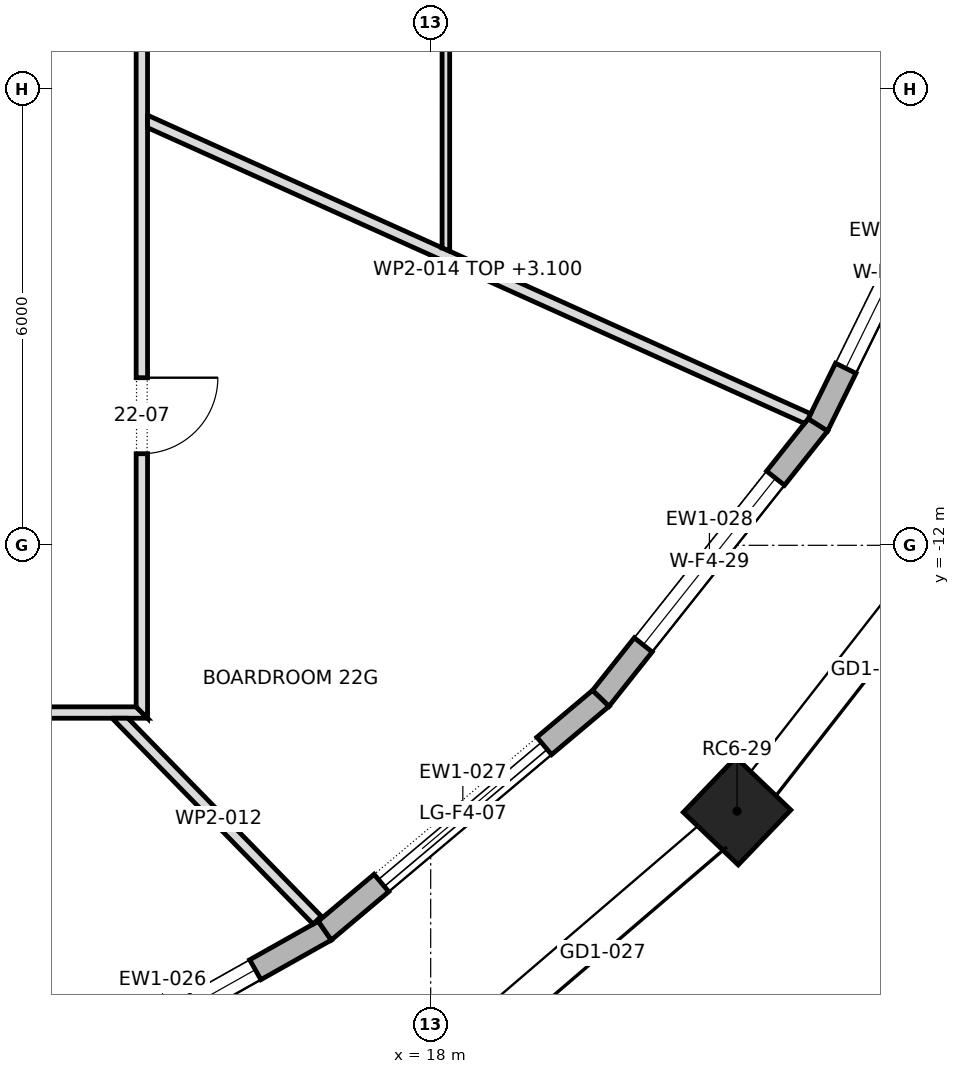
"""IFC4 building model, lengths in metres.
Left out: names, types, materials, properties, quantities, classifications, styles, units other than length and angle.
Written with IfcOpenShell. Run it as: python <this file> out.ifc"""

import sys

from ifc_helpers import new_model, si_unit, direction, frame, frame_2d, origin, origin_2d, place, context, subcontext, project, spatial, polyline, rectangle, outline, extrude, element, fill, save


model = new_model("IFC4")
c1 = context("Model", 3, precision=1e-05, world=origin(), true_north=direction((0.0, 1.0)))
c2 = subcontext(c1, "Body", "Model", "MODEL_VIEW")
j1 = project(units=[si_unit("LENGTHUNIT", "METRE"), si_unit("PLANEANGLEUNIT", "RADIAN")], contexts=[c1])
p1 = place(None, origin())
s1 = spatial("IfcSite", under=j1, at=p1, CompositionType="ELEMENT")
p2 = place(p1, origin())
s2 = spatial("IfcBuilding", under=s1, at=p2, CompositionType="ELEMENT")
p3 = place(p2, frame((0.0, 0.0, 312.3)))
s3 = spatial("IfcBuildingStorey", under=s2, at=p3, CompositionType="ELEMENT", Elevation=312.3)
p4 = place(p3, frame((22.031, -15.497, 0.0), z_axis=(0.0, 0.0, 1.0), x_axis=(0.691578612608, 0.722301199351, 0.0)))
e1 = element("IfcColumn", 1, at=p4, inside=s3, PredefinedType="COLUMN", context=c2, shape_type="SweptSolid", body=[
    extrude(rectangle(XDim=1.0, YDim=1.0, at=origin_2d()), origin(), (0.0, 0.0, 1.0), 4.0),
])
p5 = place(p3, frame((12.338, -19.471, 0.0), z_axis=(0.0, 0.0, 1.0), x_axis=(0.871570211895, 0.490270706588, 0.0)))
e2 = element("IfcWall", 2, at=p5, inside=s3, PredefinedType="STANDARD", context=c2, shape_type="SweptSolid", body=[
    extrude(outline(polyline([(-0.013, -0.15), (4.912, -0.15), (4.883, 0.15), (0.013, 0.15), (-0.013, -0.15)])), origin(), (0.0, 0.0, 1.0), 3.7),
])
p6 = place(p5, frame((1.049, 0.0, 0.6)))
e3 = element("IfcOpeningElement", 3, at=p6, cuts=e2, PredefinedType="OPENING", context=c2, shape_type="SweptSolid", body=[
    extrude(rectangle(XDim=2.8, YDim=2.65, at=frame_2d((1.4, 1.325))), frame((0.0, 0.162, 0.0), z_axis=(0.0, -1.0, 0.0), x_axis=(1.0, 0.0, 0.0)), (0.0, 0.0, 1.0), 0.324),
])
p7 = place(p3, frame((16.607, -17.07, 0.0), z_axis=(0.0, 0.0, 1.0), x_axis=(0.765059193792, 0.643959959931, 0.0)))
e4 = element("IfcWall", 4, at=p7, inside=s3, PredefinedType="STANDARD", context=c2, shape_type="SweptSolid", body=[
    extrude(outline(polyline([(-0.014, -0.15), (4.763, -0.15), (4.733, 0.15), (0.014, 0.15), (-0.014, -0.15)])), origin(), (0.0, 0.0, 1.0), 3.7),
])
p8 = place(p7, frame((0.974, 0.0, 0.0)))
e5 = element("IfcOpeningElement", 5, at=p8, cuts=e4, PredefinedType="OPENING", context=c2, shape_type="SweptSolid", body=[
    extrude(rectangle(XDim=2.8, YDim=3.25, at=frame_2d((1.4, 1.625))), frame((0.0, 0.162, 0.0), z_axis=(0.0, -1.0, 0.0), x_axis=(1.0, 0.0, 0.0)), (0.0, 0.0, 1.0), 0.324),
])
p9 = place(p3, frame((20.239, -14.012, 0.0), z_axis=(0.0, 0.0, 1.0), x_axis=(0.621682706372, 0.78326918272, 0.0)))
e6 = element("IfcWall", 6, at=p9, inside=s3, PredefinedType="STANDARD", context=c2, shape_type="SweptSolid", body=[
    extrude(outline(polyline([(-0.015, -0.15), (4.609, -0.15), (4.577, 0.15), (0.015, 0.15), (-0.015, -0.15)])), origin(), (0.0, 0.0, 1.0), 3.7),
])
p10 = place(p9, frame((0.896, 0.0, 0.6)))
e7 = element("IfcOpeningElement", 7, at=p10, cuts=e6, PredefinedType="OPENING", context=c2, shape_type="SweptSolid", body=[
    extrude(rectangle(XDim=2.8, YDim=2.65, at=frame_2d((1.4, 1.325))), frame((0.0, 0.162, 0.0), z_axis=(0.0, -1.0, 0.0), x_axis=(1.0, 0.0, 0.0)), (0.0, 0.0, 1.0), 0.324),
])
p11 = place(p3, frame((23.094, -10.415, 0.0), z_axis=(0.0, 0.0, 1.0), x_axis=(0.441509050872, 0.897256796017, 0.0)))
e8 = element("IfcWall", 8, at=p11, inside=s3, PredefinedType="STANDARD", context=c2, shape_type="SweptSolid", body=[
    extrude(outline(polyline([(-0.016, -0.15), (4.475, -0.15), (4.441, 0.15), (0.016, 0.15), (-0.016, -0.15)])), origin(), (0.0, 0.0, 1.0), 3.7),
])
p12 = place(p11, frame((0.829, 0.0, 0.6)))
e9 = element("IfcOpeningElement", 9, at=p12, cuts=e8, PredefinedType="OPENING", context=c2, shape_type="SweptSolid", body=[
    extrude(rectangle(XDim=2.8, YDim=2.65, at=frame_2d((1.4, 1.325))), frame((0.0, 0.162, 0.0), z_axis=(0.0, -1.0, 0.0), x_axis=(1.0, 0.0, 0.0)), (0.0, 0.0, 1.0), 0.324),
])
p13 = place(p3, frame((-14.275, -14.2, 0.0), z_axis=(0.0, 0.0, 1.0), x_axis=(1.0, 0.0, 0.0)))
e10 = element("IfcWall", 10, at=p13, inside=s3, PredefinedType="PARTITIONING", context=c2, shape_type="SweptSolid", body=[
    extrude(outline(polyline([(28.55, -0.075), (28.55, -0.075), (28.4, 0.075), (26.517, 0.075), (24.633, 0.075), (22.75, 0.075), (20.866, 0.075), (18.983, 0.075), (17.1, 0.075), (15.217, 0.075), (13.333, 0.075), (11.45, 0.075), (9.567, 0.075), (7.683, 0.075), (5.8, 0.075), (3.917, 0.075), (2.033, 0.075), (0.15, 0.075), (0.0, -0.075), (1.903, -0.075), (3.807, -0.075), (5.71, -0.075), (7.613, -0.075), (9.517, -0.075), (11.42, -0.075), (13.323, -0.075), (15.227, -0.075), (17.13, -0.075), (19.033, -0.075), (20.937, -0.075), (22.84, -0.075), (24.743, -0.075), (26.646, -0.075), (28.55, -0.075)])), origin(), (0.0, 0.0, 1.0), 3.7),
])
p14 = place(p13, frame((2.165, 0.0, 0.0)))
e11 = element("IfcOpeningElement", 11, at=p14, cuts=e10, PredefinedType="OPENING", context=c2, shape_type="SweptSolid", body=[
    extrude(rectangle(XDim=1.0, YDim=2.1, at=frame_2d((0.5, 1.05))), frame((0.0, 0.087, 0.0), z_axis=(0.0, -1.0, 0.0), x_axis=(1.0, 0.0, 0.0)), (0.0, 0.0, 1.0), 0.174),
])
p15 = place(p13, frame((11.825, 0.0, 0.0)))
e12 = element("IfcOpeningElement", 12, at=p15, cuts=e10, PredefinedType="OPENING", context=c2, shape_type="SweptSolid", body=[
    extrude(rectangle(XDim=1.0, YDim=2.1, at=frame_2d((0.5, 1.05))), frame((0.0, 0.087, 0.0), z_axis=(0.0, -1.0, 0.0), x_axis=(1.0, 0.0, 0.0)), (0.0, 0.0, 1.0), 0.174),
])
p16 = place(p13, frame((23.255, 0.0, 0.0)))
e13 = element("IfcOpeningElement", 13, at=p16, cuts=e10, PredefinedType="OPENING", context=c2, shape_type="SweptSolid", body=[
    extrude(rectangle(XDim=1.0, YDim=2.1, at=frame_2d((0.5, 1.05))), frame((0.0, 0.087, 0.0), z_axis=(0.0, -1.0, 0.0), x_axis=(1.0, 0.0, 0.0)), (0.0, 0.0, 1.0), 0.174),
])
p17 = place(p3, frame((13.862, -14.223, 0.0), z_axis=(0.0, 0.0, 1.0), x_axis=(0.698607487782, -0.715505120887, 0.0)))
e14 = element("IfcWall", 14, at=p17, inside=s3, PredefinedType="PARTITIONING", context=c2, shape_type="SweptSolid", body=[
    extrude(outline(polyline([(3.785, 0.075), (1.966, 0.075), (0.146, 0.075), (0.0, -0.074), (0.0, -0.075), (1.893, -0.075), (3.785, -0.075), (3.785, 0.075)])), origin(), (0.0, 0.0, 1.0), 3.7),
])
p18 = place(p3, frame((14.2, -14.275, 0.0), z_axis=(0.0, 0.0, 1.0), x_axis=(0.0, 1.0, 0.0)))
e15 = element("IfcWall", 15, at=p18, inside=s3, PredefinedType="PARTITIONING", context=c2, shape_type="SweptSolid", body=[
    extrude(outline(polyline([(28.55, -0.075), (28.55, -0.075), (28.4, 0.075), (26.517, 0.075), (24.633, 0.075), (22.75, 0.075), (20.866, 0.075), (18.983, 0.075), (17.1, 0.075), (15.217, 0.075), (13.333, 0.075), (11.45, 0.075), (9.567, 0.075), (7.683, 0.075), (5.8, 0.075), (3.917, 0.075), (2.033, 0.075), (0.15, 0.075), (0.0, -0.075), (1.903, -0.075), (3.807, -0.075), (5.71, -0.075), (7.613, -0.075), (9.517, -0.075), (11.42, -0.075), (13.323, -0.075), (15.227, -0.075), (17.13, -0.075), (19.033, -0.075), (20.937, -0.075), (22.84, -0.075), (24.743, -0.075), (26.646, -0.075), (28.55, -0.075)])), origin(), (0.0, 0.0, 1.0), 3.7),
])
p19 = place(p18, frame((3.48, 0.0, 0.0)))
e16 = element("IfcOpeningElement", 16, at=p19, cuts=e15, PredefinedType="OPENING", context=c2, shape_type="SweptSolid", body=[
    extrude(rectangle(XDim=1.0, YDim=2.1, at=frame_2d((0.5, 1.05))), frame((0.0, 0.087, 0.0), z_axis=(0.0, -1.0, 0.0), x_axis=(1.0, 0.0, 0.0)), (0.0, 0.0, 1.0), 0.174),
])
p20 = place(p18, frame((9.99, 0.0, 0.0)))
e17 = element("IfcOpeningElement", 17, at=p20, cuts=e15, PredefinedType="OPENING", context=c2, shape_type="SweptSolid", body=[
    extrude(rectangle(XDim=1.0, YDim=2.1, at=frame_2d((0.5, 1.05))), frame((0.0, 0.087, 0.0), z_axis=(0.0, -1.0, 0.0), x_axis=(1.0, 0.0, 0.0)), (0.0, 0.0, 1.0), 0.174),
])
p21 = place(p18, frame((15.0, 0.0, 0.0)))
e18 = element("IfcOpeningElement", 18, at=p21, cuts=e15, PredefinedType="OPENING", context=c2, shape_type="SweptSolid", body=[
    extrude(rectangle(XDim=1.0, YDim=2.1, at=frame_2d((0.5, 1.05))), frame((0.0, 0.087, 0.0), z_axis=(0.0, -1.0, 0.0), x_axis=(1.0, 0.0, 0.0)), (0.0, 0.0, 1.0), 0.174),
])
p22 = place(p18, frame((20.495, 0.0, 0.0)))
e19 = element("IfcOpeningElement", 19, at=p22, cuts=e15, PredefinedType="OPENING", context=c2, shape_type="SweptSolid", body=[
    extrude(rectangle(XDim=1.0, YDim=2.1, at=frame_2d((0.5, 1.05))), frame((0.0, 0.087, 0.0), z_axis=(0.0, -1.0, 0.0), x_axis=(1.0, 0.0, 0.0)), (0.0, 0.0, 1.0), 0.174),
])
p23 = place(p3, frame((14.245, -6.41, 0.0), z_axis=(0.0, 0.0, 1.0), x_axis=(0.911854164739, -0.410514289944, 0.0)))
e20 = element("IfcWall", 20, at=p23, inside=s3, PredefinedType="PARTITIONING", context=c2, shape_type="SweptSolid", body=[
    extrude(outline(polyline([(0.067, -0.075), (1.963, -0.075), (3.858, -0.075), (5.754, -0.075), (7.649, -0.075), (9.545, -0.075), (9.564, 0.003), (9.567, 0.069), (9.567, 0.075), (7.795, 0.075), (6.024, 0.075), (4.252, 0.075), (4.25, 0.074), (4.249, 0.075), (2.833, 0.075), (1.417, 0.075), (0.0, 0.075), (0.0, 0.074), (0.067, -0.075)])), origin(), (0.0, 0.0, 1.0), 3.1),
])
p24 = place(p3, frame((18.2, -1.581, 0.0), z_axis=(0.0, 0.0, 1.0), x_axis=(0.0, -1.0, 0.0)))
e21 = element("IfcWall", 21, at=p24, inside=s3, PredefinedType="PARTITIONING", context=c2, shape_type="SweptSolid", body=[
    extrude(outline(polyline([(0.0, -0.05), (1.626, -0.05), (3.252, -0.05), (4.879, -0.05), (6.505, -0.05), (6.55, 0.05), (6.55, 0.05), (4.915, 0.05), (3.279, 0.05), (1.643, 0.05), (0.008, 0.05), (0.0, -0.044), (0.0, -0.05)])), origin(), (0.0, 0.0, 1.0), 3.7),
])
p25 = place(p24, frame((2.819, 0.0, 0.0)))
e22 = element("IfcOpeningElement", 22, at=p25, cuts=e21, PredefinedType="OPENING", context=c2, shape_type="SweptSolid", body=[
    extrude(rectangle(XDim=0.9, YDim=2.1, at=frame_2d((0.45, 1.05))), frame((0.0, 0.062, 0.0), z_axis=(0.0, -1.0, 0.0), x_axis=(1.0, 0.0, 0.0)), (0.0, 0.0, 1.0), 0.124),
])
p26 = place(p6, origin())
e23 = element("IfcWindow", 23, at=p26, inside=s3, PartitioningType="DOUBLE_PANEL_VERTICAL", PredefinedType="WINDOW", context=c2, shape_type="SweptSolid", body=[
    extrude(rectangle(XDim=2.8, YDim=2.65, at=frame_2d((1.4, 1.325))), frame((0.0, 0.03, 0.0), z_axis=(0.0, -1.0, 0.0), x_axis=(1.0, 0.0, 0.0)), (0.0, 0.0, 1.0), 0.06),
])
fill(e3, e23)
p27 = place(p8, origin())
e24 = element("IfcDoor", 24, at=p27, inside=s3, OperationType="DOUBLE_DOOR_SLIDING", PredefinedType="DOOR", context=c2, shape_type="SweptSolid", body=[
    extrude(rectangle(XDim=2.8, YDim=3.25, at=frame_2d((1.4, 1.625))), frame((0.0, 0.025, 0.0), z_axis=(0.0, -1.0, 0.0), x_axis=(1.0, 0.0, 0.0)), (0.0, 0.0, 1.0), 0.05),
])
fill(e5, e24)
p28 = place(p10, origin())
e25 = element("IfcWindow", 25, at=p28, inside=s3, PartitioningType="DOUBLE_PANEL_VERTICAL", PredefinedType="WINDOW", context=c2, shape_type="SweptSolid", body=[
    extrude(rectangle(XDim=2.8, YDim=2.65, at=frame_2d((1.4, 1.325))), frame((0.0, 0.03, 0.0), z_axis=(0.0, -1.0, 0.0), x_axis=(1.0, 0.0, 0.0)), (0.0, 0.0, 1.0), 0.06),
])
fill(e7, e25)
p29 = place(p12, origin())
e26 = element("IfcWindow", 26, at=p29, inside=s3, PartitioningType="DOUBLE_PANEL_VERTICAL", PredefinedType="WINDOW", context=c2, shape_type="SweptSolid", body=[
    extrude(rectangle(XDim=2.8, YDim=2.65, at=frame_2d((1.4, 1.325))), frame((0.0, 0.03, 0.0), z_axis=(0.0, -1.0, 0.0), x_axis=(1.0, 0.0, 0.0)), (0.0, 0.0, 1.0), 0.06),
])
fill(e9, e26)
p30 = place(p19, frame((1.0, 0.0, 0.0), z_axis=(0.0, 0.0, 1.0), x_axis=(-1.0, 0.0, 0.0)))
e27 = element("IfcDoor", 27, at=p30, inside=s3, OperationType="SINGLE_SWING_RIGHT", PredefinedType="DOOR", context=c2, shape_type="SweptSolid", body=[
    extrude(rectangle(XDim=1.0, YDim=2.1, at=frame_2d((0.5, 1.05))), frame((0.0, 0.025, 0.0), z_axis=(0.0, -1.0, 0.0), x_axis=(1.0, 0.0, 0.0)), (0.0, 0.0, 1.0), 0.05),
])
fill(e16, e27)
save(model, sys.argv[1])
